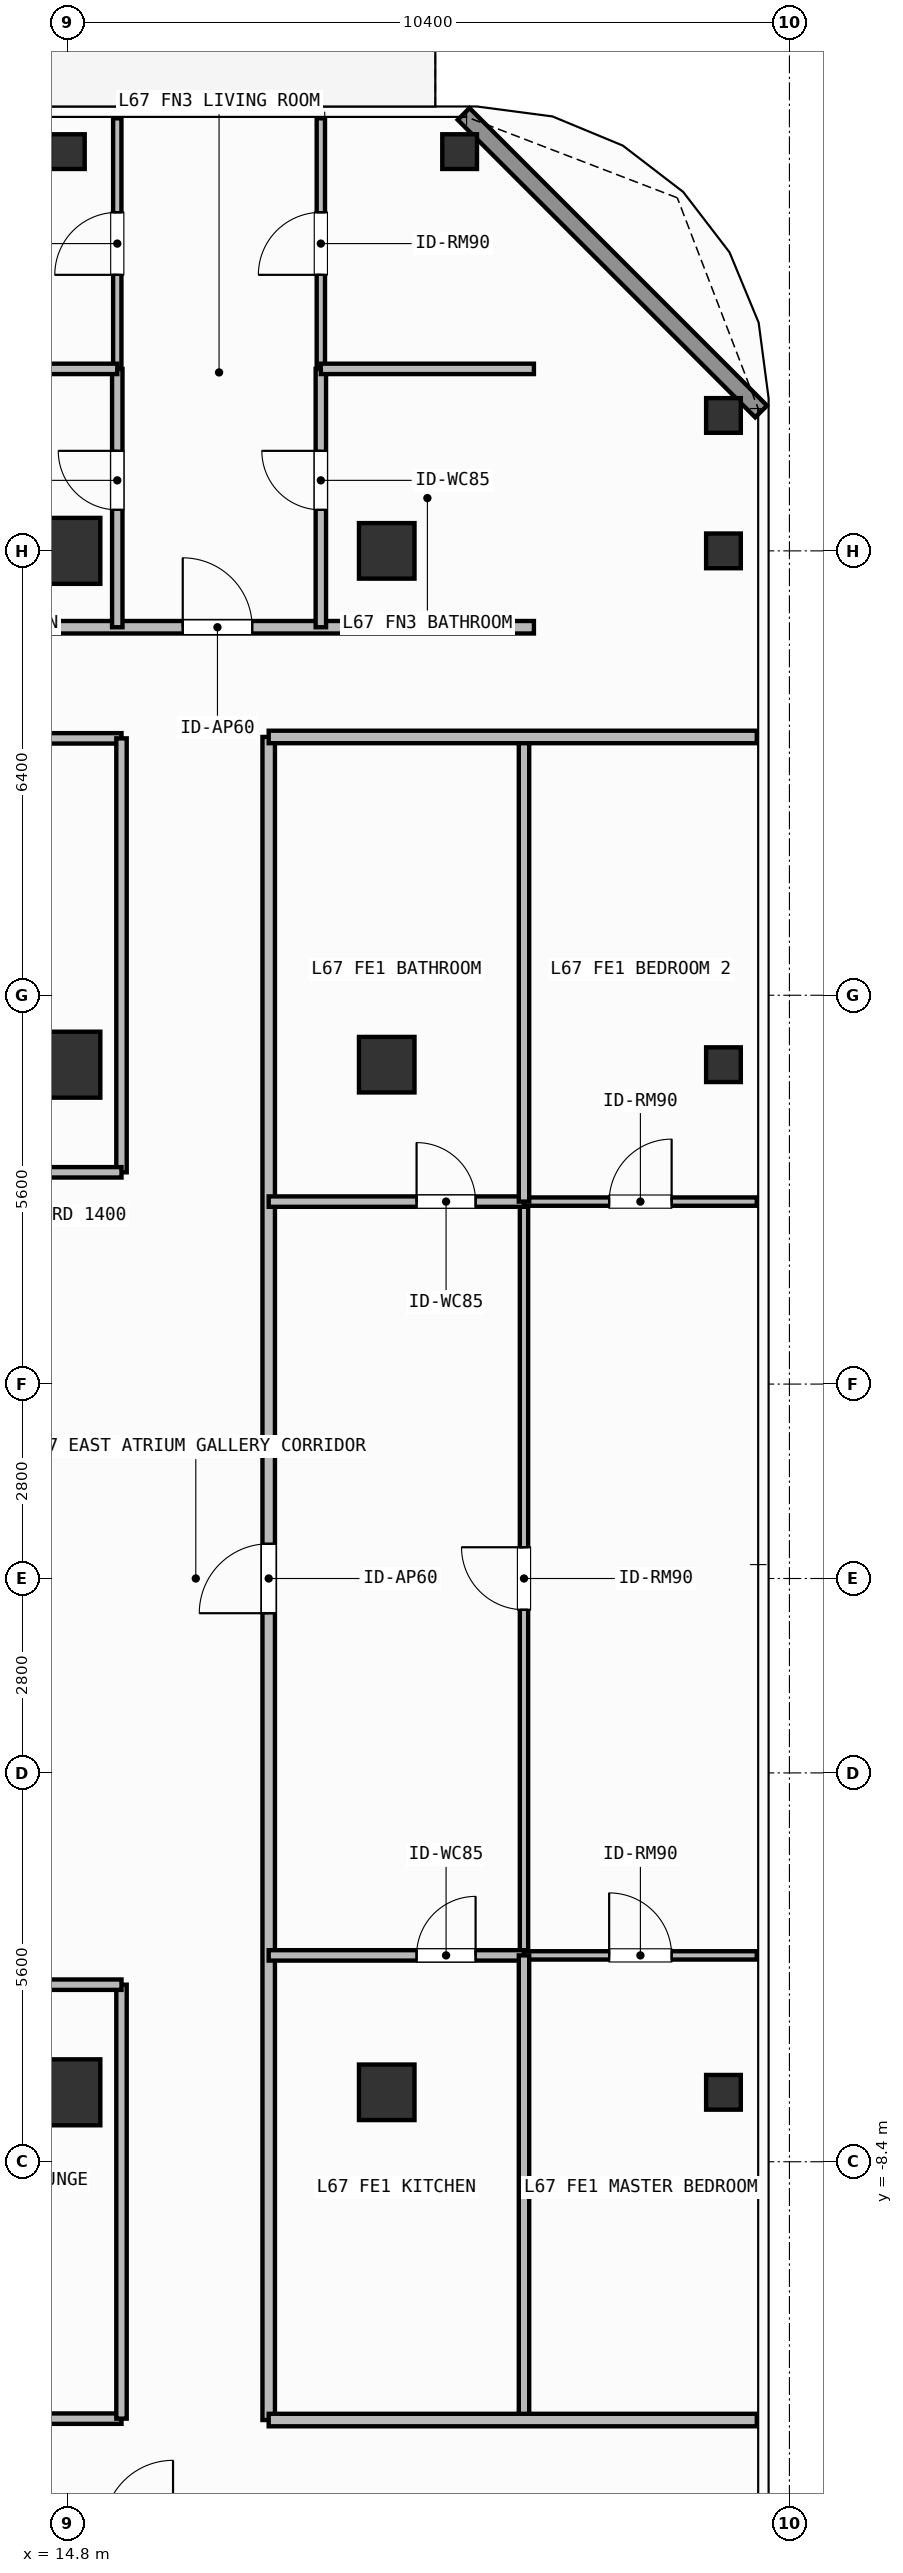
"""IFC4 building model, lengths in metres.
Left out: names, types, materials, properties, quantities, classifications, styles, units other than length and angle.
Written with IfcOpenShell. Run it as: python <this file> out.ifc"""

import sys

from ifc_helpers import new_model, si_unit, direction, frame, frame_2d, origin, origin_2d, place, context, subcontext, project, spatial, rectangle, hollow_rectangle, extrude, element, fill, save


model = new_model("IFC4")
c1 = context("Model", 3, precision=1e-05, world=origin(), true_north=direction((0.0, 1.0)))
c2 = subcontext(c1, "Body", "Model", "MODEL_VIEW")
j1 = project(units=[si_unit("LENGTHUNIT", "METRE"), si_unit("PLANEANGLEUNIT", "RADIAN")], contexts=[c1])
p1 = place(None, origin())
s1 = spatial("IfcSite", under=j1, at=p1, CompositionType="ELEMENT")
p2 = place(p1, origin())
s2 = spatial("IfcBuilding", under=s1, at=p2, CompositionType="ELEMENT")
p3 = place(p2, frame((0.0, 0.0, 274.2)))
s3 = spatial("IfcBuildingStorey", under=s2, at=p3, CompositionType="ELEMENT", Elevation=274.2)
for number, where, z_axis, x_axis in (
    (1, (14.8, 14.8, 0.0), (0.0, 0.0, 1.0), (1.0, 0.0, 0.0)),
    (2, (14.8, -7.4, 0.0), (0.0, 0.0, 1.0), (1.0, 0.0, 0.0)),
    (3, (14.8, 7.4, 0.0), (0.0, 0.0, 1.0), (1.0, 0.0, 0.0)),
):
    element("IfcColumn", number, at=place(p3, frame(where, z_axis=z_axis, x_axis=x_axis)), inside=s3, PredefinedType="COLUMN", context=c2, shape_type="SweptSolid", body=[
        extrude(rectangle(XDim=0.95, YDim=0.95, at=origin_2d()), origin(), (0.0, 0.0, 1.0), 3.9),
    ])
for number, where, z_axis, x_axis in (
    (4, (19.4, -7.4, 0.0), (0.0, 0.0, 1.0), (1.0, 0.0, 0.0)),
    (5, (19.4, 7.4, 0.0), (0.0, 0.0, 1.0), (1.0, 0.0, 0.0)),
    (6, (19.4, 14.8, 0.0), (0.0, 0.0, 1.0), (1.0, 0.0, 0.0)),
):
    element("IfcColumn", number, at=place(p3, frame(where, z_axis=z_axis, x_axis=x_axis)), inside=s3, PredefinedType="COLUMN", context=c2, shape_type="SweptSolid", body=[
        extrude(hollow_rectangle(XDim=0.8, YDim=0.8, WallThickness=0.036, at=origin_2d()), origin(), (0.0, 0.0, 1.0), 3.9),
    ])
for number, where, z_axis, x_axis in (
    (7, (20.45, 20.55, 0.0), (0.0, 0.0, 1.0), (1.0, 0.0, 0.0)),
    (8, (24.25, 16.75, 0.0), (0.0, 0.0, 1.0), (1.0, 0.0, 0.0)),
    (9, (14.8, 20.55, 0.0), (0.0, 0.0, 1.0), (1.0, 0.0, 0.0)),
    (10, (24.25, -7.4, 0.0), (0.0, 0.0, 1.0), (1.0, 0.0, 0.0)),
    (11, (24.25, 7.4, 0.0), (0.0, 0.0, 1.0), (1.0, 0.0, 0.0)),
    (12, (24.25, 14.8, 0.0), (0.0, 0.0, 1.0), (1.0, 0.0, 0.0)),
):
    element("IfcColumn", number, at=place(p3, frame(where, z_axis=z_axis, x_axis=x_axis)), inside=s3, PredefinedType="COLUMN", context=c2, shape_type="SweptSolid", body=[
        extrude(hollow_rectangle(XDim=0.5, YDim=0.5, WallThickness=0.025, at=origin_2d()), origin(), (0.0, 0.0, 1.0), 3.9),
    ])
p4 = place(p3, frame((20.508, 21.092, 0.0), z_axis=(0.0, 0.0, 1.0), x_axis=(0.707126925818, -0.707086635981, 0.0)))
e13 = element("IfcWall", 13, at=p4, inside=s3, PredefinedType="SOLIDWALL", context=c2, shape_type="SweptSolid", body=[
    extrude(rectangle(XDim=6.06, YDim=0.24, at=frame_2d((3.03, 0.0))), origin(), (0.0, 0.0, 1.0), 3.68),
])
p5 = place(p3, frame((10.1, -12.1, 0.0), z_axis=(0.0, 0.0, 1.0), x_axis=(1.0, 0.0, 0.0)))
e14 = element("IfcWall", 14, at=p5, inside=s3, PredefinedType="PARTITIONING", context=c2, shape_type="SweptSolid", body=[
    extrude(rectangle(XDim=5.48, YDim=0.15, at=frame_2d((2.74, 0.0))), origin(), (0.0, 0.0, 1.0), 3.68),
])
p6 = place(p5, frame((2.29, 0.0, 0.0)))
e15 = element("IfcOpeningElement", 15, at=p6, cuts=e14, PredefinedType="OPENING", context=c2, shape_type="SweptSolid", body=[
    extrude(rectangle(XDim=0.9, YDim=2.1, at=frame_2d((0.45, 1.05))), frame((0.0, 0.085, 0.0), z_axis=(0.0, -1.0, 0.0), x_axis=(1.0, 0.0, 0.0)), (0.0, 0.0, 1.0), 0.17),
])
p7 = place(p3, frame((8.36, 12.1, 0.0), z_axis=(0.0, 0.0, 1.0), x_axis=(1.0, 0.0, 0.0)))
e16 = element("IfcWall", 16, at=p7, inside=s3, PredefinedType="PARTITIONING", context=c2, shape_type="SweptSolid", body=[
    extrude(rectangle(XDim=7.22, YDim=0.15, at=frame_2d((3.61, 0.0))), origin(), (0.0, 0.0, 1.0), 3.68),
])
p8 = place(p7, frame((3.513, 0.0, 0.0)))
e17 = element("IfcOpeningElement", 17, at=p8, cuts=e16, PredefinedType="OPENING", context=c2, shape_type="SweptSolid", body=[
    extrude(rectangle(XDim=0.9, YDim=2.1, at=frame_2d((0.45, 1.05))), frame((0.0, 0.085, 0.0), z_axis=(0.0, -1.0, 0.0), x_axis=(1.0, 0.0, 0.0)), (0.0, 0.0, 1.0), 0.17),
])
p9 = place(p3, frame((11.518, 13.7, 0.0), z_axis=(0.0, 0.0, 1.0), x_axis=(1.0, 0.0, 0.0)))
e18 = element("IfcWall", 18, at=p9, inside=s3, PredefinedType="PARTITIONING", context=c2, shape_type="SweptSolid", body=[
    extrude(rectangle(XDim=10.002, YDim=0.18, at=frame_2d((5.001, 0.0))), origin(), (0.0, 0.0, 1.0), 3.68),
])
p10 = place(p9, frame((4.944, 0.0, 0.0)))
e19 = element("IfcOpeningElement", 19, at=p10, cuts=e18, PredefinedType="OPENING", context=c2, shape_type="SweptSolid", body=[
    extrude(rectangle(XDim=1.0, YDim=2.2, at=frame_2d((0.5, 1.1))), frame((0.0, 0.1, 0.0), z_axis=(0.0, -1.0, 0.0), x_axis=(1.0, 0.0, 0.0)), (0.0, 0.0, 1.0), 0.2),
])
p11 = place(p3, frame((15.519, 13.7, 0.0), z_axis=(0.0, 0.0, 1.0), x_axis=(0.0, 1.0, 0.0)))
e20 = element("IfcWall", 20, at=p11, inside=s3, PredefinedType="PARTITIONING", context=c2, shape_type="SweptSolid", body=[
    extrude(rectangle(XDim=3.721, YDim=0.15, at=frame_2d((1.86, 0.0))), origin(), (0.0, 0.0, 1.0), 3.68),
])
p12 = place(p11, frame((1.691, 0.0, 0.0)))
e21 = element("IfcOpeningElement", 21, at=p12, cuts=e20, PredefinedType="OPENING", context=c2, shape_type="SweptSolid", body=[
    extrude(rectangle(XDim=0.85, YDim=2.1, at=frame_2d((0.425, 1.05))), frame((0.0, 0.085, 0.0), z_axis=(0.0, -1.0, 0.0), x_axis=(1.0, 0.0, 0.0)), (0.0, 0.0, 1.0), 0.17),
])
p13 = place(p3, frame((15.519, 17.421, 0.0), z_axis=(0.0, 0.0, 1.0), x_axis=(0.0, 1.0, 0.0)))
e22 = element("IfcWall", 22, at=p13, inside=s3, PredefinedType="PARTITIONING", context=c2, shape_type="SweptSolid", body=[
    extrude(rectangle(XDim=3.609, YDim=0.12, at=frame_2d((1.805, 0.0))), origin(), (0.0, 0.0, 1.0), 3.68),
])
p14 = place(p13, frame((1.354, 0.0, 0.0)))
e23 = element("IfcOpeningElement", 23, at=p14, cuts=e22, PredefinedType="OPENING", context=c2, shape_type="SweptSolid", body=[
    extrude(rectangle(XDim=0.9, YDim=2.1, at=frame_2d((0.45, 1.05))), frame((0.0, 0.07, 0.0), z_axis=(0.0, -1.0, 0.0), x_axis=(1.0, 0.0, 0.0)), (0.0, 0.0, 1.0), 0.14),
])
p15 = place(p3, frame((18.451, 13.7, 0.0), z_axis=(0.0, 0.0, 1.0), x_axis=(0.0, 1.0, 0.0)))
e24 = element("IfcWall", 24, at=p15, inside=s3, PredefinedType="PARTITIONING", context=c2, shape_type="SweptSolid", body=[
    extrude(rectangle(XDim=3.721, YDim=0.15, at=frame_2d((1.86, 0.0))), origin(), (0.0, 0.0, 1.0), 3.68),
])
p16 = place(p15, frame((1.691, 0.0, 0.0)))
e25 = element("IfcOpeningElement", 25, at=p16, cuts=e24, PredefinedType="OPENING", context=c2, shape_type="SweptSolid", body=[
    extrude(rectangle(XDim=0.85, YDim=2.1, at=frame_2d((0.425, 1.05))), frame((0.0, 0.085, 0.0), z_axis=(0.0, -1.0, 0.0), x_axis=(1.0, 0.0, 0.0)), (0.0, 0.0, 1.0), 0.17),
])
p17 = place(p3, frame((18.451, 17.421, 0.0), z_axis=(0.0, 0.0, 1.0), x_axis=(0.0, 1.0, 0.0)))
e26 = element("IfcWall", 26, at=p17, inside=s3, PredefinedType="PARTITIONING", context=c2, shape_type="SweptSolid", body=[
    extrude(rectangle(XDim=3.609, YDim=0.12, at=frame_2d((1.805, 0.0))), origin(), (0.0, 0.0, 1.0), 3.68),
])
p18 = place(p17, frame((1.354, 0.0, 0.0)))
e27 = element("IfcOpeningElement", 27, at=p18, cuts=e26, PredefinedType="OPENING", context=c2, shape_type="SweptSolid", body=[
    extrude(rectangle(XDim=0.9, YDim=2.1, at=frame_2d((0.45, 1.05))), frame((0.0, 0.07, 0.0), z_axis=(0.0, -1.0, 0.0), x_axis=(1.0, 0.0, 0.0)), (0.0, 0.0, 1.0), 0.14),
])
p19 = place(p3, frame((17.7, -12.12, 0.0), z_axis=(0.0, 0.0, 1.0), x_axis=(0.0, 1.0, 0.0)))
e28 = element("IfcWall", 28, at=p19, inside=s3, PredefinedType="PARTITIONING", context=c2, shape_type="SweptSolid", body=[
    extrude(rectangle(XDim=24.24, YDim=0.18, at=frame_2d((12.12, 0.0))), origin(), (0.0, 0.0, 1.0), 3.68),
])
p20 = place(p19, frame((11.62, 0.0, 0.0)))
e29 = element("IfcOpeningElement", 29, at=p20, cuts=e28, PredefinedType="OPENING", context=c2, shape_type="SweptSolid", body=[
    extrude(rectangle(XDim=1.0, YDim=2.2, at=frame_2d((0.5, 1.1))), frame((0.0, 0.1, 0.0), z_axis=(0.0, -1.0, 0.0), x_axis=(1.0, 0.0, 0.0)), (0.0, 0.0, 1.0), 0.2),
])
p21 = place(p3, frame((21.377, -5.428, 0.0), z_axis=(0.0, 0.0, 1.0), x_axis=(0.0, 1.0, 0.0)))
e30 = element("IfcWall", 30, at=p21, inside=s3, PredefinedType="PARTITIONING", context=c2, shape_type="SweptSolid", body=[
    extrude(rectangle(XDim=10.856, YDim=0.12, at=frame_2d((5.428, 0.0))), origin(), (0.0, 0.0, 1.0), 3.68),
])
p22 = place(p21, frame((4.978, 0.0, 0.0)))
e31 = element("IfcOpeningElement", 31, at=p22, cuts=e30, PredefinedType="OPENING", context=c2, shape_type="SweptSolid", body=[
    extrude(rectangle(XDim=0.9, YDim=2.1, at=frame_2d((0.45, 1.05))), frame((0.0, 0.07, 0.0), z_axis=(0.0, -1.0, 0.0), x_axis=(1.0, 0.0, 0.0)), (0.0, 0.0, 1.0), 0.14),
])
p23 = place(p3, frame((17.7, 5.428, 0.0), z_axis=(0.0, 0.0, 1.0), x_axis=(1.0, 0.0, 0.0)))
e32 = element("IfcWall", 32, at=p23, inside=s3, PredefinedType="PARTITIONING", context=c2, shape_type="SweptSolid", body=[
    extrude(rectangle(XDim=3.677, YDim=0.15, at=frame_2d((1.838, 0.0))), origin(), (0.0, 0.0, 1.0), 3.68),
])
p24 = place(p23, frame((2.13, 0.0, 0.0)))
e33 = element("IfcOpeningElement", 33, at=p24, cuts=e32, PredefinedType="OPENING", context=c2, shape_type="SweptSolid", body=[
    extrude(rectangle(XDim=0.85, YDim=2.1, at=frame_2d((0.425, 1.05))), frame((0.0, 0.085, 0.0), z_axis=(0.0, -1.0, 0.0), x_axis=(1.0, 0.0, 0.0)), (0.0, 0.0, 1.0), 0.17),
])
p25 = place(p3, frame((17.7, -5.428, 0.0), z_axis=(0.0, 0.0, 1.0), x_axis=(1.0, 0.0, 0.0)))
e34 = element("IfcWall", 34, at=p25, inside=s3, PredefinedType="PARTITIONING", context=c2, shape_type="SweptSolid", body=[
    extrude(rectangle(XDim=3.677, YDim=0.15, at=frame_2d((1.838, 0.0))), origin(), (0.0, 0.0, 1.0), 3.68),
])
p26 = place(p25, frame((2.13, 0.0, 0.0)))
e35 = element("IfcOpeningElement", 35, at=p26, cuts=e34, PredefinedType="OPENING", context=c2, shape_type="SweptSolid", body=[
    extrude(rectangle(XDim=0.85, YDim=2.1, at=frame_2d((0.425, 1.05))), frame((0.0, 0.085, 0.0), z_axis=(0.0, -1.0, 0.0), x_axis=(1.0, 0.0, 0.0)), (0.0, 0.0, 1.0), 0.17),
])
p27 = place(p3, frame((21.377, -5.428, 0.0), z_axis=(0.0, 0.0, 1.0), x_axis=(1.0, 0.0, 0.0)))
e36 = element("IfcWall", 36, at=p27, inside=s3, PredefinedType="PARTITIONING", context=c2, shape_type="SweptSolid", body=[
    extrude(rectangle(XDim=3.353, YDim=0.12, at=frame_2d((1.677, 0.0))), origin(), (0.0, 0.0, 1.0), 3.68),
])
p28 = place(p27, frame((1.227, 0.0, 0.0)))
e37 = element("IfcOpeningElement", 37, at=p28, cuts=e36, PredefinedType="OPENING", context=c2, shape_type="SweptSolid", body=[
    extrude(rectangle(XDim=0.9, YDim=2.1, at=frame_2d((0.45, 1.05))), frame((0.0, 0.07, 0.0), z_axis=(0.0, -1.0, 0.0), x_axis=(1.0, 0.0, 0.0)), (0.0, 0.0, 1.0), 0.14),
])
p29 = place(p3, frame((21.377, 5.428, 0.0), z_axis=(0.0, 0.0, 1.0), x_axis=(1.0, 0.0, 0.0)))
e38 = element("IfcWall", 38, at=p29, inside=s3, PredefinedType="PARTITIONING", context=c2, shape_type="SweptSolid", body=[
    extrude(rectangle(XDim=3.353, YDim=0.12, at=frame_2d((1.677, 0.0))), origin(), (0.0, 0.0, 1.0), 3.68),
])
p30 = place(p29, frame((1.227, 0.0, 0.0)))
e39 = element("IfcOpeningElement", 39, at=p30, cuts=e38, PredefinedType="OPENING", context=c2, shape_type="SweptSolid", body=[
    extrude(rectangle(XDim=0.9, YDim=2.1, at=frame_2d((0.45, 1.05))), frame((0.0, 0.07, 0.0), z_axis=(0.0, -1.0, 0.0), x_axis=(1.0, 0.0, 0.0)), (0.0, 0.0, 1.0), 0.14),
])
p31 = place(p3, frame((15.58, -12.1, 0.0), z_axis=(0.0, 0.0, 1.0), x_axis=(0.0, 1.0, 0.0)))
e40 = element("IfcWall", 40, at=p31, inside=s3, PredefinedType="PARTITIONING", context=c2, shape_type="SweptSolid", body=[
    extrude(rectangle(XDim=6.25, YDim=0.15, at=frame_2d((3.125, 0.0))), origin(), (0.0, 0.0, 1.0), 3.68),
])
p32 = place(p3, frame((8.96, -5.85, 0.0), z_axis=(0.0, 0.0, 1.0), x_axis=(1.0, 0.0, 0.0)))
e41 = element("IfcWall", 41, at=p32, inside=s3, PredefinedType="PARTITIONING", context=c2, shape_type="SweptSolid", body=[
    extrude(rectangle(XDim=6.62, YDim=0.15, at=frame_2d((3.31, 0.0))), origin(), (0.0, 0.0, 1.0), 3.68),
])
p33 = place(p3, frame((15.58, 5.85, 0.0), z_axis=(0.0, 0.0, 1.0), x_axis=(0.0, 1.0, 0.0)))
e42 = element("IfcWall", 42, at=p33, inside=s3, PredefinedType="PARTITIONING", context=c2, shape_type="SweptSolid", body=[
    extrude(rectangle(XDim=6.25, YDim=0.15, at=frame_2d((3.125, 0.0))), origin(), (0.0, 0.0, 1.0), 3.68),
])
p34 = place(p3, frame((8.96, 5.85, 0.0), z_axis=(0.0, 0.0, 1.0), x_axis=(1.0, 0.0, 0.0)))
e43 = element("IfcWall", 43, at=p34, inside=s3, PredefinedType="PARTITIONING", context=c2, shape_type="SweptSolid", body=[
    extrude(rectangle(XDim=6.62, YDim=0.15, at=frame_2d((3.31, 0.0))), origin(), (0.0, 0.0, 1.0), 3.68),
])
p35 = place(p3, frame((11.518, 17.421, 0.0), z_axis=(0.0, 0.0, 1.0), x_axis=(1.0, 0.0, 0.0)))
e44 = element("IfcWall", 44, at=p35, inside=s3, PredefinedType="PARTITIONING", context=c2, shape_type="SweptSolid", body=[
    extrude(rectangle(XDim=4.001, YDim=0.15, at=frame_2d((2.0, 0.0))), origin(), (0.0, 0.0, 1.0), 3.68),
])
p36 = place(p3, frame((18.451, 17.421, 0.0), z_axis=(0.0, 0.0, 1.0), x_axis=(1.0, 0.0, 0.0)))
e45 = element("IfcWall", 45, at=p36, inside=s3, PredefinedType="PARTITIONING", context=c2, shape_type="SweptSolid", body=[
    extrude(rectangle(XDim=3.069, YDim=0.15, at=frame_2d((1.535, 0.0))), origin(), (0.0, 0.0, 1.0), 3.68),
])
for number, where, z_axis, x_axis in (
    (46, (21.377, -12.12, 0.0), (0.0, 0.0, 1.0), (0.0, 1.0, 0.0)),
    (47, (21.377, 5.428, 0.0), (0.0, 0.0, 1.0), (0.0, 1.0, 0.0)),
):
    element("IfcWall", number, at=place(p3, frame(where, z_axis=z_axis, x_axis=x_axis)), inside=s3, PredefinedType="PARTITIONING", context=c2, shape_type="SweptSolid", body=[
        extrude(rectangle(XDim=6.692, YDim=0.15, at=frame_2d((3.346, 0.0))), origin(), (0.0, 0.0, 1.0), 3.68),
    ])
for number, where, z_axis, x_axis in (
    (48, (17.7, -12.12, 0.0), (0.0, 0.0, 1.0), (1.0, 0.0, 0.0)),
    (49, (17.7, 12.12, 0.0), (0.0, 0.0, 1.0), (1.0, 0.0, 0.0)),
):
    element("IfcWall", number, at=place(p3, frame(where, z_axis=z_axis, x_axis=x_axis)), inside=s3, PredefinedType="PARTITIONING", context=c2, shape_type="SweptSolid", body=[
        extrude(rectangle(XDim=7.03, YDim=0.18, at=frame_2d((3.515, 0.0))), origin(), (0.0, 0.0, 1.0), 3.68),
    ])
p37 = place(p10, origin())
e50 = element("IfcDoor", 50, at=p37, inside=s3, OperationType="SINGLE_SWING_LEFT", PredefinedType="DOOR", context=c2, shape_type="SweptSolid", body=[
    extrude(rectangle(XDim=1.0, YDim=2.2, at=frame_2d((0.5, 1.1))), frame((0.0, 0.025, 0.0), z_axis=(0.0, -1.0, 0.0), x_axis=(1.0, 0.0, 0.0)), (0.0, 0.0, 1.0), 0.05),
])
fill(e19, e50)
p38 = place(p12, origin())
e51 = element("IfcDoor", 51, at=p38, inside=s3, OperationType="SINGLE_SWING_RIGHT", PredefinedType="DOOR", context=c2, shape_type="SweptSolid", body=[
    extrude(rectangle(XDim=0.85, YDim=2.1, at=frame_2d((0.425, 1.05))), frame((0.0, 0.025, 0.0), z_axis=(0.0, -1.0, 0.0), x_axis=(1.0, 0.0, 0.0)), (0.0, 0.0, 1.0), 0.05),
])
fill(e21, e51)
p39 = place(p14, origin())
e52 = element("IfcDoor", 52, at=p39, inside=s3, OperationType="SINGLE_SWING_LEFT", PredefinedType="DOOR", context=c2, shape_type="SweptSolid", body=[
    extrude(rectangle(XDim=0.9, YDim=2.1, at=frame_2d((0.45, 1.05))), frame((0.0, 0.025, 0.0), z_axis=(0.0, -1.0, 0.0), x_axis=(1.0, 0.0, 0.0)), (0.0, 0.0, 1.0), 0.05),
])
fill(e23, e52)
p40 = place(p16, origin())
e53 = element("IfcDoor", 53, at=p40, inside=s3, OperationType="SINGLE_SWING_RIGHT", PredefinedType="DOOR", context=c2, shape_type="SweptSolid", body=[
    extrude(rectangle(XDim=0.85, YDim=2.1, at=frame_2d((0.425, 1.05))), frame((0.0, 0.025, 0.0), z_axis=(0.0, -1.0, 0.0), x_axis=(1.0, 0.0, 0.0)), (0.0, 0.0, 1.0), 0.05),
])
fill(e25, e53)
p41 = place(p18, origin())
e54 = element("IfcDoor", 54, at=p41, inside=s3, OperationType="SINGLE_SWING_LEFT", PredefinedType="DOOR", context=c2, shape_type="SweptSolid", body=[
    extrude(rectangle(XDim=0.9, YDim=2.1, at=frame_2d((0.45, 1.05))), frame((0.0, 0.025, 0.0), z_axis=(0.0, -1.0, 0.0), x_axis=(1.0, 0.0, 0.0)), (0.0, 0.0, 1.0), 0.05),
])
fill(e27, e54)
p42 = place(p20, origin())
e55 = element("IfcDoor", 55, at=p42, inside=s3, OperationType="SINGLE_SWING_LEFT", PredefinedType="DOOR", context=c2, shape_type="SweptSolid", body=[
    extrude(rectangle(XDim=1.0, YDim=2.2, at=frame_2d((0.5, 1.1))), frame((0.0, 0.025, 0.0), z_axis=(0.0, -1.0, 0.0), x_axis=(1.0, 0.0, 0.0)), (0.0, 0.0, 1.0), 0.05),
])
fill(e29, e55)
p43 = place(p22, origin())
e56 = element("IfcDoor", 56, at=p43, inside=s3, OperationType="SINGLE_SWING_RIGHT", PredefinedType="DOOR", context=c2, shape_type="SweptSolid", body=[
    extrude(rectangle(XDim=0.9, YDim=2.1, at=frame_2d((0.45, 1.05))), frame((0.0, 0.025, 0.0), z_axis=(0.0, -1.0, 0.0), x_axis=(1.0, 0.0, 0.0)), (0.0, 0.0, 1.0), 0.05),
])
fill(e31, e56)
p44 = place(p24, origin())
e57 = element("IfcDoor", 57, at=p44, inside=s3, OperationType="SINGLE_SWING_LEFT", PredefinedType="DOOR", context=c2, shape_type="SweptSolid", body=[
    extrude(rectangle(XDim=0.85, YDim=2.1, at=frame_2d((0.425, 1.05))), frame((0.0, 0.025, 0.0), z_axis=(0.0, -1.0, 0.0), x_axis=(1.0, 0.0, 0.0)), (0.0, 0.0, 1.0), 0.05),
])
fill(e33, e57)
p45 = place(p26, origin())
e58 = element("IfcDoor", 58, at=p45, inside=s3, OperationType="SINGLE_SWING_RIGHT", PredefinedType="DOOR", context=c2, shape_type="SweptSolid", body=[
    extrude(rectangle(XDim=0.85, YDim=2.1, at=frame_2d((0.425, 1.05))), frame((0.0, 0.025, 0.0), z_axis=(0.0, -1.0, 0.0), x_axis=(1.0, 0.0, 0.0)), (0.0, 0.0, 1.0), 0.05),
])
fill(e35, e58)
p46 = place(p28, origin())
e59 = element("IfcDoor", 59, at=p46, inside=s3, OperationType="SINGLE_SWING_LEFT", PredefinedType="DOOR", context=c2, shape_type="SweptSolid", body=[
    extrude(rectangle(XDim=0.9, YDim=2.1, at=frame_2d((0.45, 1.05))), frame((0.0, 0.025, 0.0), z_axis=(0.0, -1.0, 0.0), x_axis=(1.0, 0.0, 0.0)), (0.0, 0.0, 1.0), 0.05),
])
fill(e37, e59)
p47 = place(p30, origin())
e60 = element("IfcDoor", 60, at=p47, inside=s3, OperationType="SINGLE_SWING_RIGHT", PredefinedType="DOOR", context=c2, shape_type="SweptSolid", body=[
    extrude(rectangle(XDim=0.9, YDim=2.1, at=frame_2d((0.45, 1.05))), frame((0.0, 0.025, 0.0), z_axis=(0.0, -1.0, 0.0), x_axis=(1.0, 0.0, 0.0)), (0.0, 0.0, 1.0), 0.05),
])
fill(e39, e60)
save(model, sys.argv[1])
